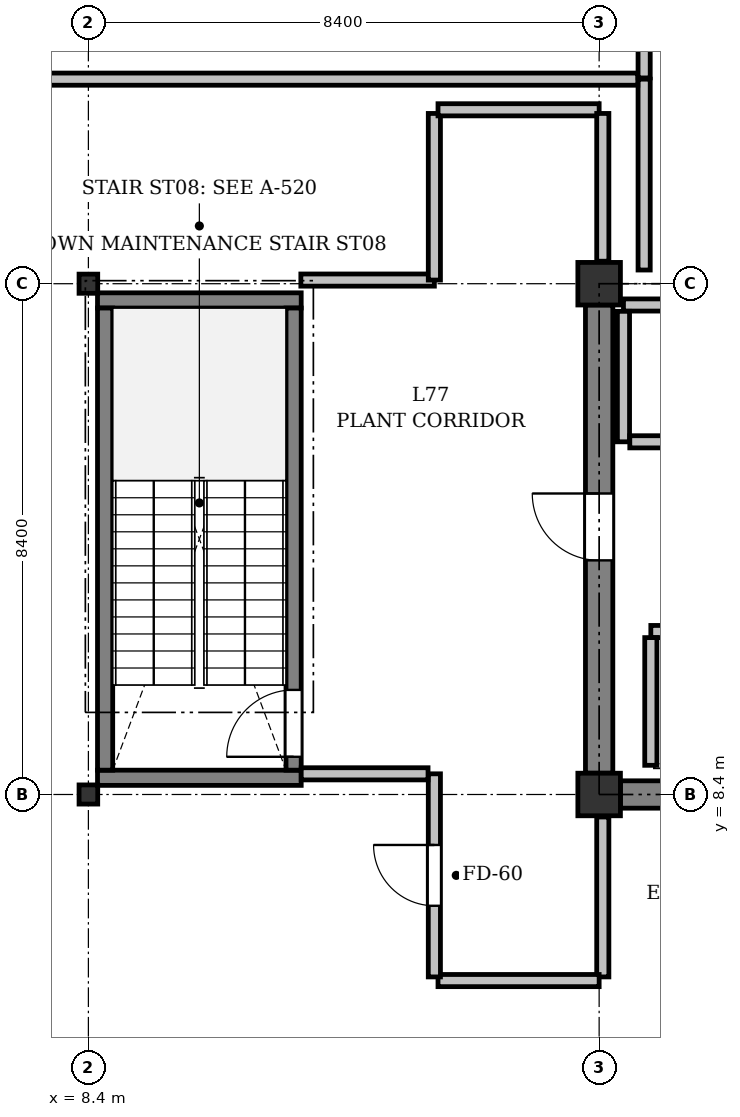
"""IFC4 building model, lengths in metres.
Left out: names, types, materials, properties, quantities, classifications, styles, units other than length and angle.
Written with IfcOpenShell. Run it as: python <this file> out.ifc"""

import sys

from ifc_helpers import new_model, si_unit, direction, frame, frame_2d, origin, origin_2d, place, context, subcontext, project, spatial, rectangle, i_section, extrude, element, fill, save


model = new_model("IFC4")
c1 = context("Model", 3, precision=1e-05, world=origin(), true_north=direction((0.0, 1.0)))
c2 = subcontext(c1, "Body", "Model", "MODEL_VIEW")
j1 = project(units=[si_unit("LENGTHUNIT", "METRE"), si_unit("PLANEANGLEUNIT", "RADIAN")], contexts=[c1])
p1 = place(None, origin())
s1 = spatial("IfcSite", under=j1, at=p1, CompositionType="ELEMENT")
p2 = place(p1, origin())
s2 = spatial("IfcBuilding", under=s1, at=p2, CompositionType="ELEMENT")
p3 = place(p2, frame((0.0, 0.0, 322.2)))
s3 = spatial("IfcBuildingStorey", under=s2, at=p3, CompositionType="ELEMENT", Elevation=322.2)
for number, where, z_axis, x_axis in (
    (1, (8.4, 8.4, 0.0), (0.0, 0.0, 1.0), (1.0, 0.0, 0.0)),
    (2, (8.4, 16.8, 0.0), (0.0, 0.0, 1.0), (1.0, 0.0, 0.0)),
):
    element("IfcColumn", number, at=place(p3, frame(where, z_axis=z_axis, x_axis=x_axis)), inside=s3, PredefinedType="COLUMN", context=c2, shape_type="SweptSolid", body=[
        extrude(i_section(OverallWidth=0.307, OverallDepth=0.315, WebThickness=0.012, FlangeThickness=0.019, FilletRadius=0.017, at=origin_2d()), origin(), (0.0, 0.0, 1.0), 4.8),
    ])
for number, where, z_axis, x_axis in (
    (3, (16.8, 8.4, 0.0), (0.0, 0.0, 1.0), (1.0, 0.0, 0.0)),
    (4, (16.8, 16.8, 0.0), (0.0, 0.0, 1.0), (1.0, 0.0, 0.0)),
):
    element("IfcColumn", number, at=place(p3, frame(where, z_axis=z_axis, x_axis=x_axis)), inside=s3, PredefinedType="COLUMN", context=c2, shape_type="SweptSolid", body=[
        extrude(rectangle(XDim=0.7, YDim=0.7, at=origin_2d()), origin(), (0.0, 0.0, 1.0), 4.8),
    ])
p4 = place(p3, frame((17.15, 8.4, 0.0), z_axis=(0.0, 0.0, 1.0), x_axis=(1.0, 0.0, 0.0)))
e5 = element("IfcWall", 5, at=p4, inside=s3, PredefinedType="SHEAR", context=c2, shape_type="SweptSolid", body=[
    extrude(rectangle(XDim=7.7, YDim=0.45, at=frame_2d((3.85, 0.0))), origin(), (0.0, 0.0, 1.0), 4.45),
])
p5 = place(p3, frame((16.8, 8.75, 0.0), z_axis=(0.0, 0.0, 1.0), x_axis=(0.0, 1.0, 0.0)))
e6 = element("IfcWall", 6, at=p5, inside=s3, PredefinedType="SHEAR", context=c2, shape_type="SweptSolid", body=[
    extrude(rectangle(XDim=7.7, YDim=0.45, at=frame_2d((3.85, 0.0))), origin(), (0.0, 0.0, 1.0), 4.45),
])
p6 = place(p5, frame((3.5, 0.0, 0.0)))
e7 = element("IfcOpeningElement", 7, at=p6, cuts=e6, PredefinedType="OPENING", context=c2, shape_type="SweptSolid", body=[
    extrude(rectangle(XDim=1.1, YDim=2.15, at=frame_2d((0.55, 1.075))), frame((0.0, 0.235, 0.0), z_axis=(0.0, -1.0, 0.0), x_axis=(1.0, 0.0, 0.0)), (0.0, 0.0, 1.0), 0.47),
])
for number, where, z_axis, x_axis in (
    (8, (11.9, 8.675, -0.35), (0.0, 0.0, 1.0), (-1.0, 0.0, 0.0)),
    (9, (11.9, 16.525, -0.35), (0.0, 0.0, 1.0), (-1.0, 0.0, 0.0)),
):
    element("IfcWall", number, at=place(p3, frame(where, z_axis=z_axis, x_axis=x_axis)), inside=s3, PredefinedType="SHEAR", context=c2, shape_type="SweptSolid", body=[
        extrude(rectangle(XDim=3.35, YDim=0.25, at=frame_2d((1.675, 0.0))), origin(), (0.0, 0.0, 1.0), 4.8),
    ])
p7 = place(p3, frame((11.775, 8.8, -0.35), z_axis=(0.0, 0.0, 1.0), x_axis=(0.0, 1.0, 0.0)))
e10 = element("IfcWall", 10, at=p7, inside=s3, PredefinedType="SHEAR", context=c2, shape_type="SweptSolid", body=[
    extrude(rectangle(XDim=7.6, YDim=0.25, at=frame_2d((3.8, 0.0))), origin(), (0.0, 0.0, 1.0), 4.8),
])
p8 = place(p7, frame((0.22, 0.0, 0.35)))
e11 = element("IfcOpeningElement", 11, at=p8, cuts=e10, PredefinedType="OPENING", context=c2, shape_type="SweptSolid", body=[
    extrude(rectangle(XDim=1.1, YDim=2.15, at=frame_2d((0.55, 1.075))), frame((0.0, 0.135, 0.0), z_axis=(0.0, -1.0, 0.0), x_axis=(1.0, 0.0, 0.0)), (0.0, 0.0, 1.0), 0.27),
])
p9 = place(p3, frame((8.675, 8.8, -0.35), z_axis=(0.0, 0.0, 1.0), x_axis=(0.0, 1.0, 0.0)))
e12 = element("IfcWall", 12, at=p9, inside=s3, PredefinedType="SHEAR", context=c2, shape_type="SweptSolid", body=[
    extrude(rectangle(XDim=7.6, YDim=0.25, at=frame_2d((3.8, 0.0))), origin(), (0.0, 0.0, 1.0), 4.8),
])
p10 = place(p3, frame((17.65, 11.08, 0.0), z_axis=(0.0, 0.0, 1.0), x_axis=(1.0, 0.0, 0.0)))
e13 = element("IfcWall", 13, at=p10, inside=s3, PredefinedType="PARTITIONING", context=c2, shape_type="SweptSolid", body=[
    extrude(rectangle(XDim=2.55, YDim=0.2, at=frame_2d((1.275, 0.0))), origin(), (0.0, 0.0, 1.0), 4.45),
])
p11 = place(p10, frame((0.725, 0.0, 0.0)))
e14 = element("IfcOpeningElement", 14, at=p11, cuts=e13, PredefinedType="OPENING", context=c2, shape_type="SweptSolid", body=[
    extrude(rectangle(XDim=1.1, YDim=2.2, at=frame_2d((0.55, 1.1))), frame((0.0, 0.11, 0.0), z_axis=(0.0, -1.0, 0.0), x_axis=(1.0, 0.0, 0.0)), (0.0, 0.0, 1.0), 0.22),
])
p12 = place(p3, frame((17.65, 8.88, 0.0), z_axis=(0.0, 0.0, 1.0), x_axis=(0.0, 1.0, 0.0)))
e15 = element("IfcWall", 15, at=p12, inside=s3, PredefinedType="PARTITIONING", context=c2, shape_type="SweptSolid", body=[
    extrude(rectangle(XDim=2.1, YDim=0.2, at=frame_2d((1.05, 0.0))), origin(), (0.0, 0.0, 1.0), 4.45),
])
p13 = place(p3, frame((24.845, 16.45, 0.0), z_axis=(0.0, 0.0, 1.0), x_axis=(-1.0, 0.0, 0.0)))
e16 = element("IfcWall", 16, at=p13, inside=s3, PredefinedType="PARTITIONING", context=c2, shape_type="SweptSolid", body=[
    extrude(rectangle(XDim=7.645, YDim=0.2, at=frame_2d((3.823, 0.0))), origin(), (0.0, 0.0, 1.0), 4.45),
])
p14 = place(p3, frame((17.2, 16.346, 0.0), z_axis=(0.0, 0.0, 1.0), x_axis=(0.0, -1.0, 0.0)))
e17 = element("IfcWall", 17, at=p14, inside=s3, PredefinedType="PARTITIONING", context=c2, shape_type="SweptSolid", body=[
    extrude(rectangle(XDim=2.146, YDim=0.2, at=frame_2d((1.073, 0.0))), origin(), (0.0, 0.0, 1.0), 4.45),
])
p15 = place(p3, frame((17.304, 14.2, 0.0), z_axis=(0.0, 0.0, 1.0), x_axis=(1.0, 0.0, 0.0)))
e18 = element("IfcWall", 18, at=p15, inside=s3, PredefinedType="PARTITIONING", context=c2, shape_type="SweptSolid", body=[
    extrude(rectangle(XDim=7.546, YDim=0.2, at=frame_2d((3.773, 0.0))), origin(), (0.0, 0.0, 1.0), 4.45),
])
p16 = place(p15, frame((3.348, 0.0, 0.0)))
e19 = element("IfcOpeningElement", 19, at=p16, cuts=e18, PredefinedType="OPENING", context=c2, shape_type="SweptSolid", body=[
    extrude(rectangle(XDim=0.85, YDim=2.15, at=frame_2d((0.425, 1.075))), frame((0.0, 0.11, 0.0), z_axis=(0.0, -1.0, 0.0), x_axis=(1.0, 0.0, 0.0)), (0.0, 0.0, 1.0), 0.22),
])
p17 = place(p3, frame((16.86, 8.03, 0.0), z_axis=(0.0, 0.0, 1.0), x_axis=(0.0, -1.0, 0.0)))
e20 = element("IfcWall", 20, at=p17, inside=s3, PredefinedType="PARTITIONING", context=c2, shape_type="SweptSolid", body=[
    extrude(rectangle(XDim=2.63, YDim=0.2, at=frame_2d((1.315, 0.0))), origin(), (0.0, 0.0, 1.0), 4.143),
])
p18 = place(p3, frame((16.8, 5.34, 0.0), z_axis=(0.0, 0.0, 1.0), x_axis=(-1.0, 0.0, 0.0)))
e21 = element("IfcWall", 21, at=p18, inside=s3, PredefinedType="PARTITIONING", context=c2, shape_type="SweptSolid", body=[
    extrude(rectangle(XDim=2.65, YDim=0.2, at=frame_2d((1.325, 0.0))), origin(), (0.0, 0.0, 1.0), 4.143),
])
p19 = place(p3, frame((14.09, 5.4, 0.0), z_axis=(0.0, 0.0, 1.0), x_axis=(0.0, 1.0, 0.0)))
e22 = element("IfcWall", 22, at=p19, inside=s3, PredefinedType="PARTITIONING", context=c2, shape_type="SweptSolid", body=[
    extrude(rectangle(XDim=3.34, YDim=0.2, at=frame_2d((1.67, 0.0))), origin(), (0.0, 0.0, 1.0), 4.091),
])
p20 = place(p19, frame((1.17, 0.0, 0.0)))
e23 = element("IfcOpeningElement", 23, at=p20, cuts=e22, PredefinedType="OPENING", context=c2, shape_type="SweptSolid", body=[
    extrude(rectangle(XDim=1.0, YDim=2.15, at=frame_2d((0.5, 1.075))), frame((0.0, 0.11, 0.0), z_axis=(0.0, -1.0, 0.0), x_axis=(1.0, 0.0, 0.0)), (0.0, 0.0, 1.0), 0.22),
])
p21 = place(p3, frame((13.986, 8.74, 0.0), z_axis=(0.0, 0.0, 1.0), x_axis=(-1.0, 0.0, 0.0)))
e24 = element("IfcWall", 24, at=p21, inside=s3, PredefinedType="PARTITIONING", context=c2, shape_type="SweptSolid", body=[
    extrude(rectangle(XDim=2.086, YDim=0.2, at=frame_2d((1.043, 0.0))), origin(), (0.0, 0.0, 1.0), 4.194),
])
p22 = place(p3, frame((11.894, 16.86, 0.0), z_axis=(0.0, 0.0, 1.0), x_axis=(0.999999975281, 0.000222345742, 0.0)))
e25 = element("IfcWall", 25, at=p22, inside=s3, PredefinedType="PARTITIONING", context=c2, shape_type="SweptSolid", body=[
    extrude(rectangle(XDim=2.196, YDim=0.2, at=frame_2d((1.098, 0.0))), origin(), (0.0, 0.0, 1.0), 4.091),
])
p23 = place(p3, frame((14.09, 16.86, 0.0), z_axis=(0.0, 0.0, 1.0), x_axis=(0.0, 1.0, 0.0)))
e26 = element("IfcWall", 26, at=p23, inside=s3, PredefinedType="PARTITIONING", context=c2, shape_type="SweptSolid", body=[
    extrude(rectangle(XDim=2.74, YDim=0.2, at=frame_2d((1.37, 0.0))), origin(), (0.0, 0.0, 1.0), 4.091),
])
p24 = place(p3, frame((14.15, 19.66, 0.0), z_axis=(0.0, 0.0, 1.0), x_axis=(1.0, 0.0, 0.0)))
e27 = element("IfcWall", 27, at=p24, inside=s3, PredefinedType="PARTITIONING", context=c2, shape_type="SweptSolid", body=[
    extrude(rectangle(XDim=2.65, YDim=0.2, at=frame_2d((1.325, 0.0))), origin(), (0.0, 0.0, 1.0), 4.143),
])
p25 = place(p3, frame((16.86, 19.6, 0.0), z_axis=(0.0, 0.0, 1.0), x_axis=(0.0, -1.0, 0.0)))
e28 = element("IfcWall", 28, at=p25, inside=s3, PredefinedType="PARTITIONING", context=c2, shape_type="SweptSolid", body=[
    extrude(rectangle(XDim=2.43, YDim=0.2, at=frame_2d((1.215, 0.0))), origin(), (0.0, 0.0, 1.0), 4.143),
])
p26 = place(p3, frame((17.54, 17.025, 0.0), z_axis=(0.0, 0.0, 1.0), x_axis=(0.0, 1.0, 0.0)))
e29 = element("IfcWall", 29, at=p26, inside=s3, PredefinedType="PARTITIONING", context=c2, shape_type="SweptSolid", body=[
    extrude(rectangle(XDim=3.139, YDim=0.2, at=frame_2d((1.57, 0.0))), origin(), (0.0, 0.0, 1.0), 4.45),
])
p27 = place(p3, frame((17.436, 20.164, 0.0), z_axis=(0.0, 0.0, 1.0), x_axis=(-1.0, 0.0, 0.0)))
e30 = element("IfcWall", 30, at=p27, inside=s3, PredefinedType="PARTITIONING", context=c2, shape_type="SweptSolid", body=[
    extrude(rectangle(XDim=17.312, YDim=0.2, at=frame_2d((8.656, 0.0))), origin(), (0.0, 0.0, 1.0), 4.143),
])
p28 = place(p3, frame((17.54, 20.184, 0.0), z_axis=(0.0, 0.0, 1.0), x_axis=(0.0, 1.0, 0.0)))
e31 = element("IfcWall", 31, at=p28, inside=s3, PredefinedType="PARTITIONING", context=c2, shape_type="SweptSolid", body=[
    extrude(rectangle(XDim=2.606, YDim=0.2, at=frame_2d((1.303, 0.0))), origin(), (0.0, 0.0, 1.0), 4.45),
])
p29 = place(p6, origin())
e32 = element("IfcDoor", 32, at=p29, inside=s3, OperationType="SINGLE_SWING_RIGHT", PredefinedType="DOOR", context=c2, shape_type="SweptSolid", body=[
    extrude(rectangle(XDim=1.1, YDim=2.15, at=frame_2d((0.55, 1.075))), frame((0.0, 0.025, 0.0), z_axis=(0.0, -1.0, 0.0), x_axis=(1.0, 0.0, 0.0)), (0.0, 0.0, 1.0), 0.05),
])
fill(e7, e32)
p30 = place(p8, origin())
e33 = element("IfcDoor", 33, at=p30, inside=s3, OperationType="SINGLE_SWING_LEFT", PredefinedType="DOOR", context=c2, shape_type="SweptSolid", body=[
    extrude(rectangle(XDim=1.1, YDim=2.15, at=frame_2d((0.55, 1.075))), frame((0.0, 0.025, 0.0), z_axis=(0.0, -1.0, 0.0), x_axis=(1.0, 0.0, 0.0)), (0.0, 0.0, 1.0), 0.05),
])
fill(e11, e33)
p31 = place(p20, origin())
e34 = element("IfcDoor", 34, at=p31, inside=s3, OperationType="SINGLE_SWING_RIGHT", PredefinedType="DOOR", context=c2, shape_type="SweptSolid", body=[
    extrude(rectangle(XDim=1.0, YDim=2.15, at=frame_2d((0.5, 1.075))), frame((0.0, 0.025, 0.0), z_axis=(0.0, -1.0, 0.0), x_axis=(1.0, 0.0, 0.0)), (0.0, 0.0, 1.0), 0.05),
])
fill(e23, e34)
save(model, sys.argv[1])
